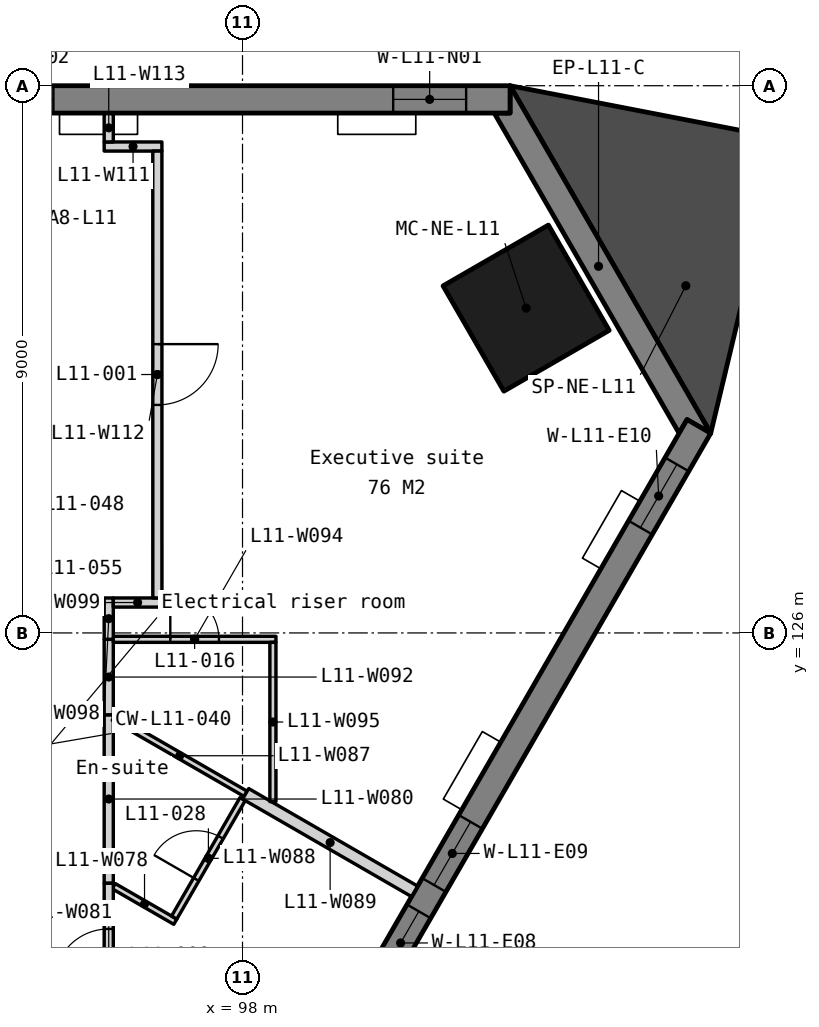
"""IFC4 building model, lengths in metres.
Left out: names, types, materials, properties, quantities, classifications, styles, units other than length and angle.
Written with IfcOpenShell. Run it as: python <this file> out.ifc"""

import sys

from ifc_helpers import new_model, si_unit, direction, frame, frame_2d, origin, origin_2d, place, context, subcontext, project, spatial, polyline, rectangle, outline, extrude, element, fill, save


model = new_model("IFC4")
c1 = context("Model", 3, precision=1e-05, world=origin(), true_north=direction((0.0, 1.0)))
c2 = subcontext(c1, "Body", "Model", "MODEL_VIEW")
j1 = project(units=[si_unit("LENGTHUNIT", "METRE"), si_unit("PLANEANGLEUNIT", "RADIAN")], contexts=[c1])
p1 = place(None, origin())
s1 = spatial("IfcSite", under=j1, at=p1, CompositionType="ELEMENT")
p2 = place(p1, origin())
s2 = spatial("IfcBuilding", under=s1, at=p2, CompositionType="ELEMENT")
p3 = place(p2, frame((0.0, 0.0, 52.5)))
s3 = spatial("IfcBuildingStorey", under=s2, at=p3, CompositionType="ELEMENT", Elevation=52.5)
p4 = place(p3, frame((102.664, 131.342, 0.0), z_axis=(0.0, 0.0, 1.0), x_axis=(-0.5, 0.866025403784, 0.0)))
e1 = element("IfcColumn", 1, at=p4, inside=s3, PredefinedType="COLUMN", context=c2, shape_type="SweptSolid", body=[
    extrude(rectangle(XDim=2.0, YDim=2.0, at=origin_2d()), origin(), (0.0, 0.0, 1.0), 3.5),
])
p5 = place(p3, frame((0.0, 0.0, -0.15)))
e2 = element("IfcWall", 2, at=p5, inside=s3, PredefinedType="SOLIDWALL", context=c2, shape_type="SweptSolid", body=[
    extrude(outline(polyline([(105.7, 129.284), (105.31, 129.509), (105.18, 129.284), (102.14, 134.55), (102.4, 134.55), (102.4, 135.0), (105.7, 129.284)])), origin(), (0.0, 0.0, 1.0), 3.5),
])
p6 = place(p3, frame((102.4, 134.775, -0.15), z_axis=(0.0, 0.0, 1.0), x_axis=(-1.0, 0.0, 0.0)))
e3 = element("IfcWall", 3, at=p6, inside=s3, PredefinedType="SOLIDWALL", context=c2, shape_type="SweptSolid", body=[
    extrude(outline(polyline([(44.8, 0.0), (44.8, 3.5), (0.0, 3.5), (0.0, 0.0), (44.8, 0.0)])), frame((0.0, 0.225, 0.0), z_axis=(0.0, -1.0, 0.0), x_axis=(1.0, 0.0, 0.0)), (0.0, 0.0, 1.0), 0.45),
])
p7 = place(p6, frame((0.722, 0.0, 1.05)))
e4 = element("IfcOpeningElement", 4, at=p7, cuts=e3, PredefinedType="OPENING", context=c2, shape_type="SweptSolid", body=[
    extrude(rectangle(XDim=1.2, YDim=1.5, at=frame_2d((0.6, 0.75))), frame((0.0, 0.235, 0.0), z_axis=(0.0, -1.0, 0.0), x_axis=(1.0, 0.0, 0.0)), (0.0, 0.0, 1.0), 0.47),
])
p8 = place(p6, frame((7.51, 0.0, 1.05)))
e5 = element("IfcOpeningElement", 5, at=p8, cuts=e3, PredefinedType="OPENING", context=c2, shape_type="SweptSolid", body=[
    extrude(rectangle(XDim=1.2, YDim=1.5, at=frame_2d((0.6, 0.75))), frame((0.0, 0.235, 0.0), z_axis=(0.0, -1.0, 0.0), x_axis=(1.0, 0.0, 0.0)), (0.0, 0.0, 1.0), 0.47),
])
p9 = place(p6, frame((9.21, 0.0, 1.05)))
e6 = element("IfcOpeningElement", 6, at=p9, cuts=e3, PredefinedType="OPENING", context=c2, shape_type="SweptSolid", body=[
    extrude(rectangle(XDim=1.2, YDim=1.5, at=frame_2d((0.6, 0.75))), frame((0.0, 0.235, 0.0), z_axis=(0.0, -1.0, 0.0), x_axis=(1.0, 0.0, 0.0)), (0.0, 0.0, 1.0), 0.47),
])
p10 = place(p6, frame((16.47, 0.0, 1.05)))
e7 = element("IfcOpeningElement", 7, at=p10, cuts=e3, PredefinedType="OPENING", context=c2, shape_type="SweptSolid", body=[
    extrude(rectangle(XDim=1.2, YDim=1.5, at=frame_2d((0.6, 0.75))), frame((0.0, 0.235, 0.0), z_axis=(0.0, -1.0, 0.0), x_axis=(1.0, 0.0, 0.0)), (0.0, 0.0, 1.0), 0.47),
])
p11 = place(p6, frame((18.17, 0.0, 1.05)))
e8 = element("IfcOpeningElement", 8, at=p11, cuts=e3, PredefinedType="OPENING", context=c2, shape_type="SweptSolid", body=[
    extrude(rectangle(XDim=1.2, YDim=1.5, at=frame_2d((0.6, 0.75))), frame((0.0, 0.235, 0.0), z_axis=(0.0, -1.0, 0.0), x_axis=(1.0, 0.0, 0.0)), (0.0, 0.0, 1.0), 0.47),
])
p12 = place(p6, frame((25.43, 0.0, 1.05)))
e9 = element("IfcOpeningElement", 9, at=p12, cuts=e3, PredefinedType="OPENING", context=c2, shape_type="SweptSolid", body=[
    extrude(rectangle(XDim=1.2, YDim=1.5, at=frame_2d((0.6, 0.75))), frame((0.0, 0.235, 0.0), z_axis=(0.0, -1.0, 0.0), x_axis=(1.0, 0.0, 0.0)), (0.0, 0.0, 1.0), 0.47),
])
p13 = place(p6, frame((27.13, 0.0, 1.05)))
e10 = element("IfcOpeningElement", 10, at=p13, cuts=e3, PredefinedType="OPENING", context=c2, shape_type="SweptSolid", body=[
    extrude(rectangle(XDim=1.2, YDim=1.5, at=frame_2d((0.6, 0.75))), frame((0.0, 0.235, 0.0), z_axis=(0.0, -1.0, 0.0), x_axis=(1.0, 0.0, 0.0)), (0.0, 0.0, 1.0), 0.47),
])
p14 = place(p6, frame((34.39, 0.0, 1.05)))
e11 = element("IfcOpeningElement", 11, at=p14, cuts=e3, PredefinedType="OPENING", context=c2, shape_type="SweptSolid", body=[
    extrude(rectangle(XDim=1.2, YDim=1.5, at=frame_2d((0.6, 0.75))), frame((0.0, 0.235, 0.0), z_axis=(0.0, -1.0, 0.0), x_axis=(1.0, 0.0, 0.0)), (0.0, 0.0, 1.0), 0.47),
])
p15 = place(p6, frame((36.09, 0.0, 1.05)))
e12 = element("IfcOpeningElement", 12, at=p15, cuts=e3, PredefinedType="OPENING", context=c2, shape_type="SweptSolid", body=[
    extrude(rectangle(XDim=1.2, YDim=1.5, at=frame_2d((0.6, 0.75))), frame((0.0, 0.235, 0.0), z_axis=(0.0, -1.0, 0.0), x_axis=(1.0, 0.0, 0.0)), (0.0, 0.0, 1.0), 0.47),
])
p16 = place(p6, frame((42.878, 0.0, 1.05)))
e13 = element("IfcOpeningElement", 13, at=p16, cuts=e3, PredefinedType="OPENING", context=c2, shape_type="SweptSolid", body=[
    extrude(rectangle(XDim=1.2, YDim=1.5, at=frame_2d((0.6, 0.75))), frame((0.0, 0.235, 0.0), z_axis=(0.0, -1.0, 0.0), x_axis=(1.0, 0.0, 0.0)), (0.0, 0.0, 1.0), 0.47),
])
p17 = place(p3, frame((83.105, 90.599, -0.15), z_axis=(0.0, 0.0, 1.0), x_axis=(0.499999201451, 0.866025864826, 0.0)))
e14 = element("IfcWall", 14, at=p17, inside=s3, PredefinedType="SOLIDWALL", context=c2, shape_type="SweptSolid", body=[
    extrude(outline(polyline([(44.8, 0.0), (44.8, 3.5), (0.0, 3.5), (0.0, 0.0), (44.8, 0.0)])), frame((0.0, 0.225, 0.0), z_axis=(0.0, -1.0, 0.0), x_axis=(1.0, 0.0, 0.0)), (0.0, 0.0, 1.0), 0.45),
])
p18 = place(p17, frame((0.722, 0.0, 1.05)))
e15 = element("IfcOpeningElement", 15, at=p18, cuts=e14, PredefinedType="OPENING", context=c2, shape_type="SweptSolid", body=[
    extrude(rectangle(XDim=1.2, YDim=1.5, at=frame_2d((0.6, 0.75))), frame((0.0, 0.235, 0.0), z_axis=(0.0, -1.0, 0.0), x_axis=(1.0, 0.0, 0.0)), (0.0, 0.0, 1.0), 0.47),
])
p19 = place(p17, frame((7.51, 0.0, 1.05)))
e16 = element("IfcOpeningElement", 16, at=p19, cuts=e14, PredefinedType="OPENING", context=c2, shape_type="SweptSolid", body=[
    extrude(rectangle(XDim=1.2, YDim=1.5, at=frame_2d((0.6, 0.75))), frame((0.0, 0.235, 0.0), z_axis=(0.0, -1.0, 0.0), x_axis=(1.0, 0.0, 0.0)), (0.0, 0.0, 1.0), 0.47),
])
p20 = place(p17, frame((9.21, 0.0, 1.05)))
e17 = element("IfcOpeningElement", 17, at=p20, cuts=e14, PredefinedType="OPENING", context=c2, shape_type="SweptSolid", body=[
    extrude(rectangle(XDim=1.2, YDim=1.5, at=frame_2d((0.6, 0.75))), frame((0.0, 0.235, 0.0), z_axis=(0.0, -1.0, 0.0), x_axis=(1.0, 0.0, 0.0)), (0.0, 0.0, 1.0), 0.47),
])
p21 = place(p17, frame((16.47, 0.0, 1.05)))
e18 = element("IfcOpeningElement", 18, at=p21, cuts=e14, PredefinedType="OPENING", context=c2, shape_type="SweptSolid", body=[
    extrude(rectangle(XDim=1.2, YDim=1.5, at=frame_2d((0.6, 0.75))), frame((0.0, 0.235, 0.0), z_axis=(0.0, -1.0, 0.0), x_axis=(1.0, 0.0, 0.0)), (0.0, 0.0, 1.0), 0.47),
])
p22 = place(p17, frame((18.17, 0.0, 1.05)))
e19 = element("IfcOpeningElement", 19, at=p22, cuts=e14, PredefinedType="OPENING", context=c2, shape_type="SweptSolid", body=[
    extrude(rectangle(XDim=1.2, YDim=1.5, at=frame_2d((0.6, 0.75))), frame((0.0, 0.235, 0.0), z_axis=(0.0, -1.0, 0.0), x_axis=(1.0, 0.0, 0.0)), (0.0, 0.0, 1.0), 0.47),
])
p23 = place(p17, frame((25.43, 0.0, 1.05)))
e20 = element("IfcOpeningElement", 20, at=p23, cuts=e14, PredefinedType="OPENING", context=c2, shape_type="SweptSolid", body=[
    extrude(rectangle(XDim=1.2, YDim=1.5, at=frame_2d((0.6, 0.75))), frame((0.0, 0.235, 0.0), z_axis=(0.0, -1.0, 0.0), x_axis=(1.0, 0.0, 0.0)), (0.0, 0.0, 1.0), 0.47),
])
p24 = place(p17, frame((27.13, 0.0, 1.05)))
e21 = element("IfcOpeningElement", 21, at=p24, cuts=e14, PredefinedType="OPENING", context=c2, shape_type="SweptSolid", body=[
    extrude(rectangle(XDim=1.2, YDim=1.5, at=frame_2d((0.6, 0.75))), frame((0.0, 0.235, 0.0), z_axis=(0.0, -1.0, 0.0), x_axis=(1.0, 0.0, 0.0)), (0.0, 0.0, 1.0), 0.47),
])
p25 = place(p17, frame((34.39, 0.0, 1.05)))
e22 = element("IfcOpeningElement", 22, at=p25, cuts=e14, PredefinedType="OPENING", context=c2, shape_type="SweptSolid", body=[
    extrude(rectangle(XDim=1.2, YDim=1.5, at=frame_2d((0.6, 0.75))), frame((0.0, 0.235, 0.0), z_axis=(0.0, -1.0, 0.0), x_axis=(1.0, 0.0, 0.0)), (0.0, 0.0, 1.0), 0.47),
])
p26 = place(p17, frame((36.09, 0.0, 1.05)))
e23 = element("IfcOpeningElement", 23, at=p26, cuts=e14, PredefinedType="OPENING", context=c2, shape_type="SweptSolid", body=[
    extrude(rectangle(XDim=1.2, YDim=1.5, at=frame_2d((0.6, 0.75))), frame((0.0, 0.235, 0.0), z_axis=(0.0, -1.0, 0.0), x_axis=(1.0, 0.0, 0.0)), (0.0, 0.0, 1.0), 0.47),
])
p27 = place(p17, frame((42.878, 0.0, 1.05)))
e24 = element("IfcOpeningElement", 24, at=p27, cuts=e14, PredefinedType="OPENING", context=c2, shape_type="SweptSolid", body=[
    extrude(rectangle(XDim=1.2, YDim=1.5, at=frame_2d((0.6, 0.75))), frame((0.0, 0.235, 0.0), z_axis=(0.0, -1.0, 0.0), x_axis=(1.0, 0.0, 0.0)), (0.0, 0.0, 1.0), 0.47),
])
p28 = place(p3, frame((0.0, 0.0, -0.15)))
e25 = element("IfcWall", 25, at=p28, inside=s3, PredefinedType="SOLIDWALL", context=c2, shape_type="SweptSolid", body=[
    extrude(outline(polyline([(105.7, 129.284), (106.863, 134.135), (102.4, 135.0), (105.7, 129.284)])), origin(), (0.0, 0.0, 1.0), 3.5),
])
p29 = place(p3, frame((95.882, 121.835, 0.0), z_axis=(0.0, 0.0, 1.0), x_axis=(0.86601174498, -0.500023656998, 0.0)))
e26 = element("IfcWall", 26, at=p29, inside=s3, PredefinedType="PARTITIONING", context=c2, shape_type="SweptSolid", body=[
    extrude(rectangle(XDim=1.169, YDim=0.1, at=frame_2d((0.585, 0.0))), origin(), (0.0, 0.0, 1.0), 3.35),
])
p30 = place(p3, frame((95.8, 121.883, 0.0), z_axis=(0.0, 0.0, 1.0), x_axis=(0.0, 1.0, 0.0)))
e27 = element("IfcWall", 27, at=p30, inside=s3, PredefinedType="PARTITIONING", context=c2, shape_type="SweptSolid", body=[
    extrude(rectangle(XDim=2.771, YDim=0.15, at=frame_2d((1.386, 0.0))), origin(), (0.0, 0.0, 1.0), 3.35),
])
p31 = place(p3, frame((95.8, 119.481, 0.0), z_axis=(0.0, 0.0, 1.0), x_axis=(0.0, 1.0, 0.0)))
e28 = element("IfcWall", 28, at=p31, inside=s3, PredefinedType="PARTITIONING", context=c2, shape_type="SweptSolid", body=[
    extrude(rectangle(XDim=2.402, YDim=0.15, at=frame_2d((1.201, 0.0))), origin(), (0.0, 0.0, 1.0), 3.35),
])
p32 = place(p31, frame((0.751, 0.0, 0.0)))
e29 = element("IfcOpeningElement", 29, at=p32, cuts=e28, PredefinedType="OPENING", context=c2, shape_type="SweptSolid", body=[
    extrude(rectangle(XDim=0.9, YDim=2.1, at=frame_2d((0.45, 1.05))), frame((0.0, 0.085, 0.0), z_axis=(0.0, -1.0, 0.0), x_axis=(1.0, 0.0, 0.0)), (0.0, 0.0, 1.0), 0.17),
])
p33 = place(p3, frame((95.882, 124.606, 0.0), z_axis=(0.0, 0.0, 1.0), x_axis=(0.866039519639, -0.499975549825, 0.0)))
e30 = element("IfcWall", 30, at=p33, inside=s3, PredefinedType="PARTITIONING", context=c2, shape_type="SweptSolid", body=[
    extrude(rectangle(XDim=2.505, YDim=0.1, at=frame_2d((1.252, 0.0))), origin(), (0.0, 0.0, 1.0), 3.35),
])
p34 = place(p3, frame((96.877, 121.319, 0.0), z_axis=(0.0, 0.0, 1.0), x_axis=(0.499966648284, 0.866044658551, 0.0)))
e31 = element("IfcWall", 31, at=p34, inside=s3, PredefinedType="PARTITIONING", context=c2, shape_type="SweptSolid", body=[
    extrude(rectangle(XDim=2.25, YDim=0.1, at=frame_2d((1.125, 0.0))), origin(), (0.0, 0.0, 1.0), 3.35),
])
p35 = place(p34, frame((0.725, 0.0, 0.0)))
e32 = element("IfcOpeningElement", 32, at=p35, cuts=e31, PredefinedType="OPENING", context=c2, shape_type="SweptSolid", body=[
    extrude(rectangle(XDim=0.8, YDim=2.1, at=frame_2d((0.4, 1.05))), frame((0.0, 0.06, 0.0), z_axis=(0.0, -1.0, 0.0), x_axis=(1.0, 0.0, 0.0)), (0.0, 0.0, 1.0), 0.12),
])
p36 = place(p3, frame((98.052, 123.354, 0.0), z_axis=(0.0, 0.0, 1.0), x_axis=(0.866019585306, -0.500010077765, 0.0)))
e33 = element("IfcWall", 33, at=p36, inside=s3, PredefinedType="PARTITIONING", context=c2, shape_type="SweptSolid", body=[
    extrude(rectangle(XDim=3.208, YDim=0.2, at=frame_2d((1.604, 0.0))), origin(), (0.0, 0.0, 1.0), 3.35),
])
p37 = place(p3, frame((95.8, 124.654, 0.0), z_axis=(0.0, 0.0, 1.0), x_axis=(0.0, 1.0, 0.0)))
e34 = element("IfcWall", 34, at=p37, inside=s3, PredefinedType="PARTITIONING", context=c2, shape_type="SweptSolid", body=[
    extrude(rectangle(XDim=1.241, YDim=0.15, at=frame_2d((0.621, 0.0))), origin(), (0.0, 0.0, 1.0), 3.35),
])
p38 = place(p3, frame((95.875, 125.895, 0.0), z_axis=(0.0, 0.0, 1.0), x_axis=(1.0, 0.0, 0.0)))
e35 = element("IfcWall", 35, at=p38, inside=s3, PredefinedType="PARTITIONING", context=c2, shape_type="SweptSolid", body=[
    extrude(rectangle(XDim=2.675, YDim=0.1, at=frame_2d((1.337, 0.0))), origin(), (0.0, 0.0, 1.0), 3.35),
])
p39 = place(p38, frame((0.938, 0.0, 0.0)))
e36 = element("IfcOpeningElement", 36, at=p39, cuts=e35, PredefinedType="OPENING", context=c2, shape_type="SweptSolid", body=[
    extrude(rectangle(XDim=0.8, YDim=2.1, at=frame_2d((0.4, 1.05))), frame((0.0, 0.06, 0.0), z_axis=(0.0, -1.0, 0.0), x_axis=(1.0, 0.0, 0.0)), (0.0, 0.0, 1.0), 0.12),
])
p40 = place(p3, frame((98.5, 123.225, 0.0), z_axis=(0.0, 0.0, 1.0), x_axis=(0.0, 1.0, 0.0)))
e37 = element("IfcWall", 37, at=p40, inside=s3, PredefinedType="PARTITIONING", context=c2, shape_type="SweptSolid", body=[
    extrude(rectangle(XDim=2.62, YDim=0.1, at=frame_2d((1.31, 0.0))), origin(), (0.0, 0.0, 1.0), 3.35),
])
p41 = place(p3, frame((95.8, 125.895, 0.0), z_axis=(0.0, 0.0, 1.0), x_axis=(0.0, 1.0, 0.0)))
e38 = element("IfcWall", 38, at=p41, inside=s3, PredefinedType="PARTITIONING", context=c2, shape_type="SweptSolid", body=[
    extrude(rectangle(XDim=0.68, YDim=0.15, at=frame_2d((0.34, 0.0))), origin(), (0.0, 0.0, 1.0), 3.35),
])
p42 = place(p3, frame((95.875, 126.5, 0.0), z_axis=(0.0, 0.0, 1.0), x_axis=(1.0, 0.0, 0.0)))
e39 = element("IfcWall", 39, at=p42, inside=s3, PredefinedType="PARTITIONING", context=c2, shape_type="SweptSolid", body=[
    extrude(rectangle(XDim=0.8, YDim=0.15, at=frame_2d((0.4, 0.0))), origin(), (0.0, 0.0, 1.0), 3.35),
])
p43 = place(p3, frame((95.725, 134.0, 0.0), z_axis=(0.0, 0.0, 1.0), x_axis=(1.0, 0.0, 0.0)))
e40 = element("IfcWall", 40, at=p43, inside=s3, PredefinedType="PARTITIONING", context=c2, shape_type="SweptSolid", body=[
    extrude(rectangle(XDim=0.949, YDim=0.15, at=frame_2d((0.475, 0.0))), origin(), (0.0, 0.0, 1.0), 2.887),
])
p44 = place(p3, frame((96.6, 133.925, 0.0), z_axis=(0.0, 0.0, 1.0), x_axis=(6.643194e-05, -0.999999997793, 0.0)))
e41 = element("IfcWall", 41, at=p44, inside=s3, PredefinedType="PARTITIONING", context=c2, shape_type="SweptSolid", body=[
    extrude(rectangle(XDim=7.35, YDim=0.15, at=frame_2d((3.675, 0.0))), origin(), (0.0, 0.0, 1.0), 3.35),
])
p45 = place(p44, frame((3.175, 0.0, 0.0)))
e42 = element("IfcOpeningElement", 42, at=p45, cuts=e41, PredefinedType="OPENING", context=c2, shape_type="SweptSolid", body=[
    extrude(rectangle(XDim=1.0, YDim=2.1, at=frame_2d((0.5, 1.05))), frame((0.0, 0.085, 0.0), z_axis=(0.0, -1.0, 0.0), x_axis=(1.0, 0.0, 0.0)), (0.0, 0.0, 1.0), 0.17),
])
p46 = place(p3, frame((95.8, 134.075, 0.0), z_axis=(0.0, 0.0, 1.0), x_axis=(0.0, 1.0, 0.0)))
e43 = element("IfcWall", 43, at=p46, inside=s3, PredefinedType="PARTITIONING", context=c2, shape_type="SweptSolid", body=[
    extrude(rectangle(XDim=0.465, YDim=0.15, at=frame_2d((0.232, 0.0))), origin(), (0.0, 0.0, 1.0), 3.35),
])
p47 = place(p7, origin())
e44 = element("IfcWindow", 44, at=p47, inside=s3, PartitioningType="SINGLE_PANEL", PredefinedType="WINDOW", context=c2, shape_type="SweptSolid", body=[
    extrude(rectangle(XDim=1.2, YDim=1.5, at=frame_2d((0.6, 0.75))), frame((0.0, 0.03, 0.0), z_axis=(0.0, -1.0, 0.0), x_axis=(1.0, 0.0, 0.0)), (0.0, 0.0, 1.0), 0.06),
])
fill(e4, e44)
p48 = place(p8, origin())
e45 = element("IfcWindow", 45, at=p48, inside=s3, PartitioningType="SINGLE_PANEL", PredefinedType="WINDOW", context=c2, shape_type="SweptSolid", body=[
    extrude(rectangle(XDim=1.2, YDim=1.5, at=frame_2d((0.6, 0.75))), frame((0.0, 0.03, 0.0), z_axis=(0.0, -1.0, 0.0), x_axis=(1.0, 0.0, 0.0)), (0.0, 0.0, 1.0), 0.06),
])
fill(e5, e45)
p49 = place(p25, origin())
e46 = element("IfcWindow", 46, at=p49, inside=s3, PartitioningType="SINGLE_PANEL", PredefinedType="WINDOW", context=c2, shape_type="SweptSolid", body=[
    extrude(rectangle(XDim=1.2, YDim=1.5, at=frame_2d((0.6, 0.75))), frame((0.0, 0.03, 0.0), z_axis=(0.0, -1.0, 0.0), x_axis=(1.0, 0.0, 0.0)), (0.0, 0.0, 1.0), 0.06),
])
fill(e22, e46)
p50 = place(p26, origin())
e47 = element("IfcWindow", 47, at=p50, inside=s3, PartitioningType="SINGLE_PANEL", PredefinedType="WINDOW", context=c2, shape_type="SweptSolid", body=[
    extrude(rectangle(XDim=1.2, YDim=1.5, at=frame_2d((0.6, 0.75))), frame((0.0, 0.03, 0.0), z_axis=(0.0, -1.0, 0.0), x_axis=(1.0, 0.0, 0.0)), (0.0, 0.0, 1.0), 0.06),
])
fill(e23, e47)
p51 = place(p27, origin())
e48 = element("IfcWindow", 48, at=p51, inside=s3, PartitioningType="SINGLE_PANEL", PredefinedType="WINDOW", context=c2, shape_type="SweptSolid", body=[
    extrude(rectangle(XDim=1.2, YDim=1.5, at=frame_2d((0.6, 0.75))), frame((0.0, 0.03, 0.0), z_axis=(0.0, -1.0, 0.0), x_axis=(1.0, 0.0, 0.0)), (0.0, 0.0, 1.0), 0.06),
])
fill(e24, e48)
p52 = place(p45, origin())
e49 = element("IfcDoor", 49, at=p52, inside=s3, OperationType="SINGLE_SWING_LEFT", PredefinedType="DOOR", context=c2, shape_type="SweptSolid", body=[
    extrude(rectangle(XDim=1.0, YDim=2.1, at=frame_2d((0.5, 1.05))), frame((0.0, 0.025, 0.0), z_axis=(0.0, -1.0, 0.0), x_axis=(1.0, 0.0, 0.0)), (0.0, 0.0, 1.0), 0.05),
])
fill(e42, e49)
p53 = place(p32, origin())
e50 = element("IfcDoor", 50, at=p53, inside=s3, OperationType="SINGLE_SWING_LEFT", PredefinedType="DOOR", context=c2, shape_type="SweptSolid", body=[
    extrude(rectangle(XDim=0.9, YDim=2.1, at=frame_2d((0.45, 1.05))), frame((0.0, 0.025, 0.0), z_axis=(0.0, -1.0, 0.0), x_axis=(1.0, 0.0, 0.0)), (0.0, 0.0, 1.0), 0.05),
])
fill(e29, e50)
p54 = place(p39, origin())
e51 = element("IfcDoor", 51, at=p54, inside=s3, OperationType="SINGLE_SWING_LEFT", PredefinedType="DOOR", context=c2, shape_type="SweptSolid", body=[
    extrude(rectangle(XDim=0.8, YDim=2.1, at=frame_2d((0.4, 1.05))), frame((0.0, 0.025, 0.0), z_axis=(0.0, -1.0, 0.0), x_axis=(1.0, 0.0, 0.0)), (0.0, 0.0, 1.0), 0.05),
])
fill(e36, e51)
p55 = place(p35, origin())
e52 = element("IfcDoor", 52, at=p55, inside=s3, OperationType="SINGLE_SWING_LEFT", PredefinedType="DOOR", context=c2, shape_type="SweptSolid", body=[
    extrude(rectangle(XDim=0.8, YDim=2.1, at=frame_2d((0.4, 1.05))), frame((0.0, 0.025, 0.0), z_axis=(0.0, -1.0, 0.0), x_axis=(1.0, 0.0, 0.0)), (0.0, 0.0, 1.0), 0.05),
])
fill(e32, e52)
save(model, sys.argv[1])
